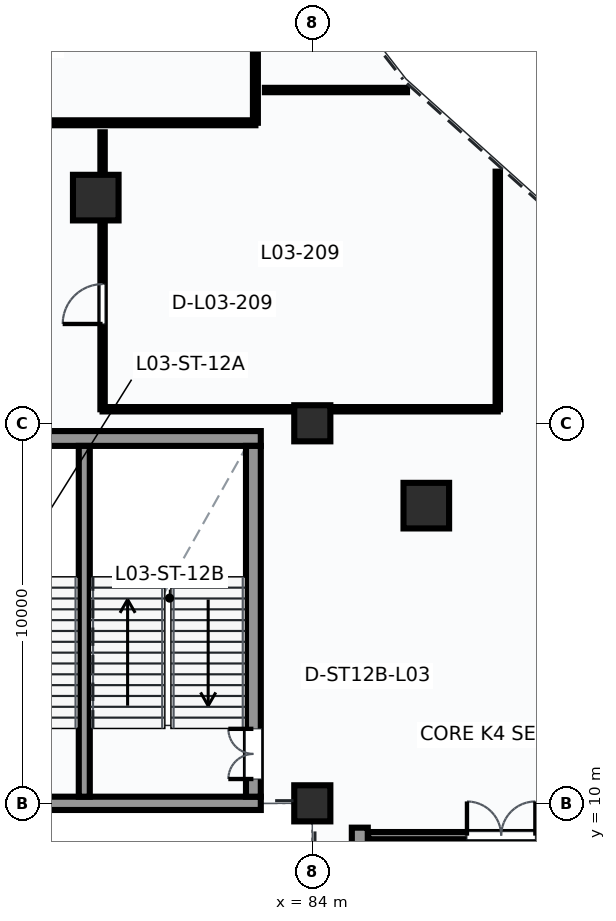
"""IFC4 building model, lengths in metres.
Left out: names, types, materials, properties, quantities, classifications, styles, units other than length and angle.
Written with IfcOpenShell. Run it as: python <this file> out.ifc"""

import sys

from ifc_helpers import new_model, si_unit, direction, frame, frame_2d, origin, origin_2d, place, context, subcontext, project, spatial, rectangle, extrude, element, fill, save


model = new_model("IFC4")
c1 = context("Model", 3, precision=1e-05, world=origin(), true_north=direction((0.0, 1.0)))
c2 = subcontext(c1, "Body", "Model", "MODEL_VIEW")
j1 = project(units=[si_unit("LENGTHUNIT", "METRE"), si_unit("PLANEANGLEUNIT", "RADIAN")], contexts=[c1])
p1 = place(None, origin())
s1 = spatial("IfcSite", under=j1, at=p1, CompositionType="ELEMENT")
p2 = place(p1, origin())
s2 = spatial("IfcBuilding", under=s1, at=p2, CompositionType="ELEMENT")
p3 = place(p2, frame((0.0, 0.0, 14.7)))
s3 = spatial("IfcBuildingStorey", under=s2, at=p3, CompositionType="ELEMENT", Elevation=14.7)
for number, where, z_axis, x_axis in (
    (1, (84.0, 10.0, 0.0), (0.0, 0.0, 1.0), (1.0, 0.0, 0.0)),
    (2, (84.0, 20.0, 0.0), (0.0, 0.0, 1.0), (1.0, 0.0, 0.0)),
):
    element("IfcColumn", number, at=place(p3, frame(where, z_axis=z_axis, x_axis=x_axis)), inside=s3, PredefinedType="COLUMN", context=c2, shape_type="SweptSolid", body=[
        extrude(rectangle(XDim=0.95, YDim=0.95, at=origin_2d()), origin(), (0.0, 0.0, 1.0), 4.5),
    ])
for number, where, z_axis, x_axis in (
    (3, (78.302, 25.938, 0.0), (0.0, 0.0, 1.0), (1.0, 0.0, 0.0)),
    (4, (87.0, 17.833, 0.0), (0.0, 0.0, 1.0), (1.0, 0.0, 0.0)),
):
    element("IfcColumn", number, at=place(p3, frame(where, z_axis=z_axis, x_axis=x_axis)), inside=s3, PredefinedType="COLUMN", context=c2, shape_type="SweptSolid", body=[
        extrude(rectangle(XDim=1.2, YDim=1.2, at=origin_2d()), origin(), (0.0, 0.0, 1.0), 4.5),
    ])
p4 = place(p3, frame((73.355, 10.0, 0.0), z_axis=(0.0, 0.0, 1.0), x_axis=(1.0, 0.0, 0.0)))
e5 = element("IfcWall", 5, at=p4, inside=s3, PredefinedType="SHEAR", context=c2, shape_type="SweptSolid", body=[
    extrude(rectangle(XDim=9.29, YDim=0.35, at=frame_2d((4.645, 0.0))), origin(), (0.0, 0.0, 1.0), 3.596),
])
p5 = place(p3, frame((73.355, 19.6, 0.0), z_axis=(0.0, 0.0, 1.0), x_axis=(1.0, 0.0, 0.0)))
e6 = element("IfcWall", 6, at=p5, inside=s3, PredefinedType="SHEAR", context=c2, shape_type="SweptSolid", body=[
    extrude(rectangle(XDim=9.29, YDim=0.39, at=frame_2d((4.645, 0.0))), origin(), (0.0, 0.0, 1.0), 4.5),
])
p6 = place(p3, frame((82.45, 10.175, 0.0), z_axis=(0.0, 0.0, 1.0), x_axis=(0.0, 1.0, 0.0)))
e7 = element("IfcWall", 7, at=p6, inside=s3, PredefinedType="SHEAR", context=c2, shape_type="SweptSolid", body=[
    extrude(rectangle(XDim=9.23, YDim=0.39, at=frame_2d((4.615, 0.0))), origin(), (0.0, 0.0, 1.0), 4.5),
])
p7 = place(p6, frame((0.465, 0.0, 0.0)))
e8 = element("IfcOpeningElement", 8, at=p7, cuts=e7, PredefinedType="OPENING", context=c2, shape_type="SweptSolid", body=[
    extrude(rectangle(XDim=1.32, YDim=2.2, at=frame_2d((0.66, 1.1))), frame((0.0, 0.205, 0.0), z_axis=(0.0, -1.0, 0.0), x_axis=(1.0, 0.0, 0.0)), (0.0, 0.0, 1.0), 0.41),
])
p8 = place(p3, frame((78.0, 10.175, 0.0), z_axis=(0.0, 0.0, 1.0), x_axis=(0.0, 1.0, 0.0)))
e9 = element("IfcWall", 9, at=p8, inside=s3, PredefinedType="SHEAR", context=c2, shape_type="SweptSolid", body=[
    extrude(rectangle(XDim=9.23, YDim=0.29, at=frame_2d((4.615, 0.0))), origin(), (0.0, 0.0, 1.0), 4.5),
])
p9 = place(p3, frame((85.25, 0.64, 0.0), z_axis=(0.0, 0.0, 1.0), x_axis=(0.0, 1.0, 0.0)))
e10 = element("IfcWall", 10, at=p9, inside=s3, PredefinedType="SHEAR", context=c2, shape_type="SweptSolid", body=[
    extrude(rectangle(XDim=8.72, YDim=0.42, at=frame_2d((4.36, 0.0))), origin(), (0.0, 0.0, 1.0), 4.5),
])
p10 = place(p3, frame((85.47, 9.15, 0.0), z_axis=(0.0, 0.0, 1.0), x_axis=(1.0, 0.0, 0.0)))
e11 = element("IfcWall", 11, at=p10, inside=s3, PredefinedType="PARTITIONING", context=c2, shape_type="SweptSolid", body=[
    extrude(rectangle(XDim=9.06, YDim=0.19, at=frame_2d((4.53, 0.0))), origin(), (0.0, 0.0, 1.0), 4.16),
])
p11 = place(p10, frame((2.6, 0.0, 0.0)))
e12 = element("IfcOpeningElement", 12, at=p11, cuts=e11, PredefinedType="OPENING", context=c2, shape_type="SweptSolid", body=[
    extrude(rectangle(XDim=1.8, YDim=2.3, at=frame_2d((0.9, 1.15))), frame((0.0, 0.105, 0.0), z_axis=(0.0, -1.0, 0.0), x_axis=(1.0, 0.0, 0.0)), (0.0, 0.0, 1.0), 0.21),
])
p12 = place(p3, frame((82.503, 33.823, 0.0), z_axis=(0.0, 0.0, 1.0), x_axis=(0.0, -1.0, 0.0)))
e13 = element("IfcWall", 13, at=p12, inside=s3, PredefinedType="PARTITIONING", context=c2, shape_type="SweptSolid", body=[
    extrude(rectangle(XDim=5.916, YDim=0.13, at=frame_2d((2.958, 0.0))), origin(), (0.0, 0.0, 1.0), 4.16),
])
p13 = place(p3, frame((82.503, 27.907, 0.0), z_axis=(0.0, 0.0, 1.0), x_axis=(-1.0, 0.0, 0.0)))
e14 = element("IfcWall", 14, at=p13, inside=s3, PredefinedType="PARTITIONING", context=c2, shape_type="SweptSolid", body=[
    extrude(rectangle(XDim=10.4, YDim=0.13, at=frame_2d((5.2, 0.0))), origin(), (0.0, 0.0, 1.0), 2.603),
])
p14 = place(p13, frame((5.948, 0.0, 0.0)))
e15 = element("IfcOpeningElement", 15, at=p14, cuts=e14, PredefinedType="OPENING", context=c2, shape_type="SweptSolid", body=[
    extrude(rectangle(XDim=1.0, YDim=2.2, at=frame_2d((0.5, 1.1))), frame((0.0, 0.075, 0.0), z_axis=(0.0, -1.0, 0.0), x_axis=(1.0, 0.0, 0.0)), (0.0, 0.0, 1.0), 0.15),
])
p15 = place(p3, frame((78.481, 20.369, 0.0), z_axis=(0.0, 0.0, 1.0), x_axis=(0.0, 1.0, 0.0)))
e16 = element("IfcWall", 16, at=p15, inside=s3, PredefinedType="PARTITIONING", context=c2, shape_type="SweptSolid", body=[
    extrude(rectangle(XDim=7.288, YDim=0.115, at=frame_2d((3.644, 0.0))), origin(), (0.0, 0.0, 1.0), 4.16),
])
p16 = place(p15, frame((2.244, 0.0, 0.0)))
e17 = element("IfcOpeningElement", 17, at=p16, cuts=e16, PredefinedType="OPENING", context=c2, shape_type="SweptSolid", body=[
    extrude(rectangle(XDim=1.05, YDim=2.2, at=frame_2d((0.525, 1.1))), frame((0.0, 0.067, 0.0), z_axis=(0.0, -1.0, 0.0), x_axis=(1.0, 0.0, 0.0)), (0.0, 0.0, 1.0), 0.135),
])
p17 = place(p3, frame((82.753, 28.769, 0.0), z_axis=(0.0, 0.0, 1.0), x_axis=(1.0, 0.0, 0.0)))
e18 = element("IfcWall", 18, at=p17, inside=s3, PredefinedType="PARTITIONING", context=c2, shape_type="SweptSolid", body=[
    extrude(rectangle(XDim=3.739, YDim=0.115, at=frame_2d((1.87, 0.0))), origin(), (0.0, 0.0, 1.0), 4.16),
])
p18 = place(p3, frame((88.881, 26.621, 0.0), z_axis=(0.0, 0.0, 1.0), x_axis=(0.0, -1.0, 0.0)))
e19 = element("IfcWall", 19, at=p18, inside=s3, PredefinedType="PARTITIONING", context=c2, shape_type="SweptSolid", body=[
    extrude(rectangle(XDim=6.252, YDim=0.115, at=frame_2d((3.126, 0.0))), origin(), (0.0, 0.0, 1.0), 4.16),
])
p19 = place(p3, frame((88.881, 20.369, 0.0), z_axis=(0.0, 0.0, 1.0), x_axis=(-1.0, 0.0, 0.0)))
e20 = element("IfcWall", 20, at=p19, inside=s3, PredefinedType="PARTITIONING", context=c2, shape_type="SweptSolid", body=[
    extrude(rectangle(XDim=10.4, YDim=0.115, at=frame_2d((5.2, 0.0))), origin(), (0.0, 0.0, 1.0), 2.603),
])
p20 = place(p7, origin())
e21 = element("IfcDoor", 21, at=p20, inside=s3, OperationType="DOUBLE_DOOR_SINGLE_SWING", PredefinedType="DOOR", context=c2, shape_type="SweptSolid", body=[
    extrude(rectangle(XDim=1.32, YDim=2.2, at=frame_2d((0.66, 1.1))), frame((0.0, 0.025, 0.0), z_axis=(0.0, -1.0, 0.0), x_axis=(1.0, 0.0, 0.0)), (0.0, 0.0, 1.0), 0.05),
])
fill(e8, e21)
p21 = place(p11, origin())
e22 = element("IfcDoor", 22, at=p21, inside=s3, OperationType="DOUBLE_DOOR_SINGLE_SWING", PredefinedType="DOOR", context=c2, shape_type="SweptSolid", body=[
    extrude(rectangle(XDim=1.8, YDim=2.3, at=frame_2d((0.9, 1.15))), frame((0.0, 0.025, 0.0), z_axis=(0.0, -1.0, 0.0), x_axis=(1.0, 0.0, 0.0)), (0.0, 0.0, 1.0), 0.05),
])
fill(e12, e22)
p22 = place(p16, origin())
e23 = element("IfcDoor", 23, at=p22, inside=s3, OperationType="SINGLE_SWING_LEFT", PredefinedType="DOOR", context=c2, shape_type="SweptSolid", body=[
    extrude(rectangle(XDim=1.05, YDim=2.2, at=frame_2d((0.525, 1.1))), frame((0.0, 0.025, 0.0), z_axis=(0.0, -1.0, 0.0), x_axis=(1.0, 0.0, 0.0)), (0.0, 0.0, 1.0), 0.05),
])
fill(e17, e23)
save(model, sys.argv[1])
